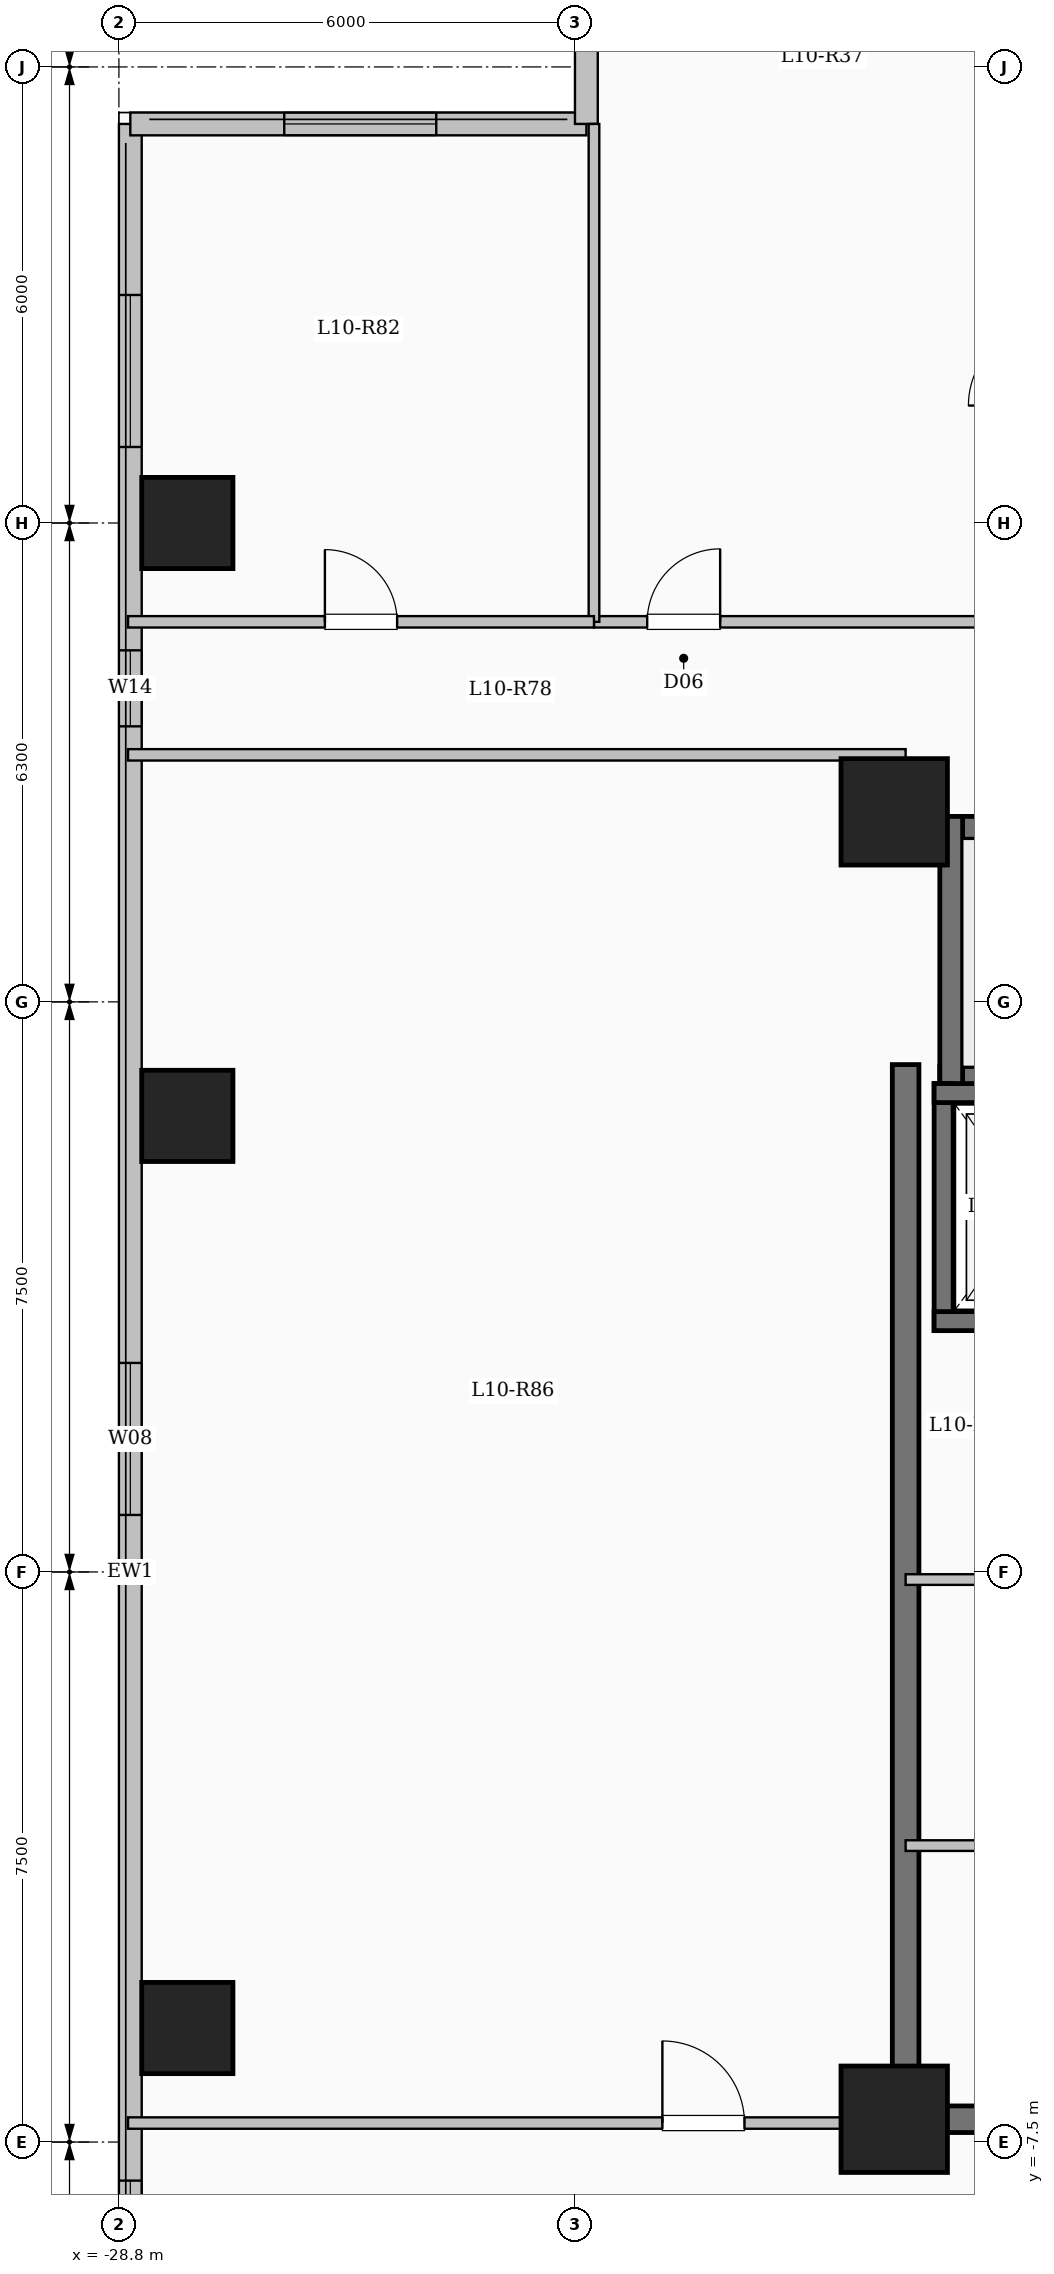
"""IFC4 building model, lengths in metres.
Left out: names, types, materials, properties, quantities, classifications, styles, units other than length and angle.
Written with IfcOpenShell. Run it as: python <this file> out.ifc"""

import sys

from ifc_helpers import new_model, si_unit, direction, frame, frame_2d, origin, origin_2d, place, context, subcontext, project, spatial, rectangle, extrude, element, fill, save


model = new_model("IFC4")
c1 = context("Model", 3, precision=1e-05, world=origin(), true_north=direction((0.0, 1.0)))
c2 = subcontext(c1, "Body", "Model", "MODEL_VIEW")
j1 = project(units=[si_unit("LENGTHUNIT", "METRE"), si_unit("PLANEANGLEUNIT", "RADIAN")], contexts=[c1])
p1 = place(None, origin())
s1 = spatial("IfcSite", under=j1, at=p1, CompositionType="ELEMENT")
p2 = place(p1, origin())
s2 = spatial("IfcBuilding", under=s1, at=p2, CompositionType="ELEMENT")
p3 = place(p2, frame((0.0, 0.0, 40.75)))
s3 = spatial("IfcBuildingStorey", under=s2, at=p3, CompositionType="ELEMENT", Elevation=40.75)
for number, where, z_axis, x_axis in (
    (1, (-18.6, -7.2, 0.0), (0.0, 0.0, 1.0), (1.0, 0.0, 0.0)),
    (2, (-18.6, 10.0, 0.0), (0.0, 0.0, 1.0), (1.0, 0.0, 0.0)),
):
    element("IfcColumn", number, at=place(p3, frame(where, z_axis=z_axis, x_axis=x_axis)), inside=s3, PredefinedType="COLUMN", context=c2, shape_type="SweptSolid", body=[
        extrude(rectangle(XDim=1.4, YDim=1.4, at=origin_2d()), origin(), (0.0, 0.0, 1.0), 3.35),
    ])
for number, where, z_axis, x_axis in (
    (3, (-27.9, -6.0, 0.0), (0.0, 0.0, 1.0), (1.0, 0.0, 0.0)),
    (4, (-27.9, 6.0, 0.0), (0.0, 0.0, 1.0), (1.0, 0.0, 0.0)),
    (5, (-27.9, 13.8, 0.0), (0.0, 0.0, 1.0), (1.0, 0.0, 0.0)),
):
    element("IfcColumn", number, at=place(p3, frame(where, z_axis=z_axis, x_axis=x_axis)), inside=s3, PredefinedType="COLUMN", context=c2, shape_type="SweptSolid", body=[
        extrude(rectangle(XDim=1.2, YDim=1.2, at=origin_2d()), origin(), (0.0, 0.0, 1.0), 3.35),
    ])
p4 = place(p3, frame((-28.65, -19.05, 0.0), z_axis=(0.0, 0.0, 1.0), x_axis=(0.0, 1.0, 0.0)))
e6 = element("IfcWall", 6, at=p4, inside=s3, PredefinedType="SOLIDWALL", context=c2, shape_type="SweptSolid", body=[
    extrude(rectangle(XDim=38.1, YDim=0.3, at=frame_2d((19.05, 0.0))), origin(), (0.0, 0.0, 1.0), 3.1),
])
p5 = place(p4, frame((3.15, 0.0, 0.9)))
e7 = element("IfcOpeningElement", 7, at=p5, cuts=e6, PredefinedType="OPENING", context=c2, shape_type="SweptSolid", body=[
    extrude(rectangle(XDim=2.4, YDim=1.8, at=frame_2d((1.2, 0.9))), frame((0.0, 0.16, 0.0), z_axis=(0.0, -1.0, 0.0), x_axis=(1.0, 0.0, 0.0)), (0.0, 0.0, 1.0), 0.32),
])
p6 = place(p4, frame((9.542, 0.0, 0.9)))
e8 = element("IfcOpeningElement", 8, at=p6, cuts=e6, PredefinedType="OPENING", context=c2, shape_type="SweptSolid", body=[
    extrude(rectangle(XDim=1.5, YDim=1.65, at=frame_2d((0.75, 0.825))), frame((0.0, 0.16, 0.0), z_axis=(0.0, -1.0, 0.0), x_axis=(1.0, 0.0, 0.0)), (0.0, 0.0, 1.0), 0.32),
])
p7 = place(p4, frame((19.8, 0.0, 0.9)))
e9 = element("IfcOpeningElement", 9, at=p7, cuts=e6, PredefinedType="OPENING", context=c2, shape_type="SweptSolid", body=[
    extrude(rectangle(XDim=2.0, YDim=1.7, at=frame_2d((1.0, 0.85))), frame((0.0, 0.16, 0.0), z_axis=(0.0, -1.0, 0.0), x_axis=(1.0, 0.0, 0.0)), (0.0, 0.0, 1.0), 0.32),
])
p8 = place(p4, frame((30.175, 0.0, 0.95)))
e10 = element("IfcOpeningElement", 10, at=p8, cuts=e6, PredefinedType="OPENING", context=c2, shape_type="SweptSolid", body=[
    extrude(rectangle(XDim=1.0, YDim=1.5, at=frame_2d((0.5, 0.75))), frame((0.0, 0.16, 0.0), z_axis=(0.0, -1.0, 0.0), x_axis=(1.0, 0.0, 0.0)), (0.0, 0.0, 1.0), 0.32),
])
p9 = place(p4, frame((33.85, 0.0, 0.9)))
e11 = element("IfcOpeningElement", 11, at=p9, cuts=e6, PredefinedType="OPENING", context=c2, shape_type="SweptSolid", body=[
    extrude(rectangle(XDim=2.0, YDim=1.7, at=frame_2d((1.0, 0.85))), frame((0.0, 0.16, 0.0), z_axis=(0.0, -1.0, 0.0), x_axis=(1.0, 0.0, 0.0)), (0.0, 0.0, 1.0), 0.32),
])
p10 = place(p3, frame((-28.65, 19.05, 0.0), z_axis=(0.0, 0.0, 1.0), x_axis=(1.0, 0.0, 0.0)))
e12 = element("IfcWall", 12, at=p10, inside=s3, PredefinedType="SOLIDWALL", context=c2, shape_type="SweptSolid", body=[
    extrude(rectangle(XDim=6.0, YDim=0.3, at=frame_2d((3.0, 0.0))), origin(), (0.0, 0.0, 1.0), 3.1),
])
p11 = place(p10, frame((2.025, 0.0, 0.9)))
e13 = element("IfcOpeningElement", 13, at=p11, cuts=e12, PredefinedType="OPENING", context=c2, shape_type="SweptSolid", body=[
    extrude(rectangle(XDim=2.0, YDim=1.7, at=frame_2d((1.0, 0.85))), frame((0.0, 0.16, 0.0), z_axis=(0.0, -1.0, 0.0), x_axis=(1.0, 0.0, 0.0)), (0.0, 0.0, 1.0), 0.32),
])
p12 = place(p3, frame((-22.65, 19.05, 0.0), z_axis=(0.0, 0.0, 1.0), x_axis=(0.0, 1.0, 0.0)))
e14 = element("IfcWall", 14, at=p12, inside=s3, PredefinedType="SOLIDWALL", context=c2, shape_type="SweptSolid", body=[
    extrude(rectangle(XDim=4.5, YDim=0.3, at=frame_2d((2.25, 0.0))), origin(), (0.0, 0.0, 1.0), 3.1),
])
p13 = place(p12, frame((1.032, 0.0, 0.9)))
e15 = element("IfcOpeningElement", 15, at=p13, cuts=e14, PredefinedType="OPENING", context=c2, shape_type="SweptSolid", body=[
    extrude(rectangle(XDim=2.4, YDim=1.8, at=frame_2d((1.2, 0.9))), frame((0.0, 0.16, 0.0), z_axis=(0.0, -1.0, 0.0), x_axis=(1.0, 0.0, 0.0)), (0.0, 0.0, 1.0), 0.32),
])
p14 = place(p3, frame((-18.0, 9.79, 0.0), z_axis=(0.0, 0.0, 1.0), x_axis=(1.0, 0.0, 0.0)))
e16 = element("IfcWall", 16, at=p14, inside=s3, PredefinedType="SHEAR", context=c2, shape_type="SweptSolid", body=[
    extrude(rectangle(XDim=8.0, YDim=0.3, at=frame_2d((4.0, 0.0))), origin(), (0.0, 0.0, 1.0), 3.35),
])
p15 = place(p3, frame((-18.0, 6.5, 0.0), z_axis=(0.0, 0.0, 1.0), x_axis=(1.0, 0.0, 0.0)))
e17 = element("IfcWall", 17, at=p15, inside=s3, PredefinedType="SHEAR", context=c2, shape_type="SweptSolid", body=[
    extrude(rectangle(XDim=8.0, YDim=0.3, at=frame_2d((4.0, 0.0))), origin(), (0.0, 0.0, 1.0), 3.35),
])
p16 = place(p15, frame((6.45, 0.0, 0.0)))
e18 = element("IfcOpeningElement", 18, at=p16, cuts=e17, PredefinedType="OPENING", context=c2, shape_type="SweptSolid", body=[
    extrude(rectangle(XDim=1.0, YDim=2.15, at=frame_2d((0.5, 1.075))), frame((0.0, 0.16, 0.0), z_axis=(0.0, -1.0, 0.0), x_axis=(1.0, 0.0, 0.0)), (0.0, 0.0, 1.0), 0.32),
])
p17 = place(p3, frame((-17.85, 6.35, 0.0), z_axis=(0.0, 0.0, 1.0), x_axis=(0.0, 1.0, 0.0)))
e19 = element("IfcWall", 19, at=p17, inside=s3, PredefinedType="SHEAR", context=c2, shape_type="SweptSolid", body=[
    extrude(rectangle(XDim=3.59, YDim=0.3, at=frame_2d((1.795, 0.0))), origin(), (0.0, 0.0, 1.0), 3.35),
])
p18 = place(p3, frame((-17.95, 3.175, 0.0), z_axis=(0.0, 0.0, 1.0), x_axis=(0.0, 1.0, 0.0)))
e20 = element("IfcWall", 20, at=p18, inside=s3, PredefinedType="SHEAR", context=c2, shape_type="SweptSolid", body=[
    extrude(rectangle(XDim=3.25, YDim=0.25, at=frame_2d((1.625, 0.0))), origin(), (0.0, 0.0, 1.0), 3.35),
])
for number, where, z_axis, x_axis in (
    (21, (-18.075, 3.3, 0.0), (0.0, 0.0, 1.0), (1.0, 0.0, 0.0)),
    (22, (-18.075, 6.3, 0.0), (0.0, 0.0, 1.0), (1.0, 0.0, 0.0)),
):
    element("IfcWall", number, at=place(p3, frame(where, z_axis=z_axis, x_axis=x_axis)), inside=s3, PredefinedType="SHEAR", context=c2, shape_type="SweptSolid", body=[
        extrude(rectangle(XDim=2.55, YDim=0.25, at=frame_2d((1.275, 0.0))), origin(), (0.0, 0.0, 1.0), 3.35),
    ])
p19 = place(p3, frame((-18.45, -7.375, 0.0), z_axis=(0.0, 0.0, 1.0), x_axis=(0.0, 1.0, 0.0)))
e23 = element("IfcWall", 23, at=p19, inside=s3, PredefinedType="SHEAR", context=c2, shape_type="SweptSolid", body=[
    extrude(rectangle(XDim=14.05, YDim=0.35, at=frame_2d((7.025, 0.0))), origin(), (0.0, 0.0, 1.0), 3.35),
])
p20 = place(p3, frame((-18.625, -7.2, 0.0), z_axis=(0.0, 0.0, 1.0), x_axis=(1.0, 0.0, 0.0)))
e24 = element("IfcWall", 24, at=p20, inside=s3, PredefinedType="SHEAR", context=c2, shape_type="SweptSolid", body=[
    extrude(rectangle(XDim=8.55, YDim=0.35, at=frame_2d((4.275, 0.0))), origin(), (0.0, 0.0, 1.0), 3.35),
])
p21 = place(p3, frame((-18.45, -3.6, 0.0), z_axis=(0.0, 0.0, 1.0), x_axis=(1.0, 0.0, 0.0)))
e25 = element("IfcWall", 25, at=p21, inside=s3, PredefinedType="PARTITIONING", context=c2, shape_type="SweptSolid", body=[
    extrude(rectangle(XDim=3.05, YDim=0.14, at=frame_2d((1.525, 0.0))), origin(), (0.0, 0.0, 1.0), 3.1),
])
p22 = place(p21, frame((1.05, 0.0, 0.0)))
e26 = element("IfcOpeningElement", 26, at=p22, cuts=e25, PredefinedType="OPENING", context=c2, shape_type="SweptSolid", body=[
    extrude(rectangle(XDim=0.9, YDim=2.08, at=frame_2d((0.45, 1.04))), frame((0.0, 0.08, 0.0), z_axis=(0.0, -1.0, 0.0), x_axis=(1.0, 0.0, 0.0)), (0.0, 0.0, 1.0), 0.16),
])
p23 = place(p3, frame((-18.45, -0.1, 0.0), z_axis=(0.0, 0.0, 1.0), x_axis=(1.0, 0.0, 0.0)))
e27 = element("IfcWall", 27, at=p23, inside=s3, PredefinedType="PARTITIONING", context=c2, shape_type="SweptSolid", body=[
    extrude(rectangle(XDim=3.05, YDim=0.14, at=frame_2d((1.525, 0.0))), origin(), (0.0, 0.0, 1.0), 3.1),
])
p24 = place(p23, frame((1.05, 0.0, 0.0)))
e28 = element("IfcOpeningElement", 28, at=p24, cuts=e27, PredefinedType="OPENING", context=c2, shape_type="SweptSolid", body=[
    extrude(rectangle(XDim=0.9, YDim=2.08, at=frame_2d((0.45, 1.04))), frame((0.0, 0.08, 0.0), z_axis=(0.0, -1.0, 0.0), x_axis=(1.0, 0.0, 0.0)), (0.0, 0.0, 1.0), 0.16),
])
p25 = place(p3, frame((-22.55, 12.5, 0.0), z_axis=(0.0, 0.0, 1.0), x_axis=(1.0, 0.0, 0.0)))
e29 = element("IfcWall", 29, at=p25, inside=s3, PredefinedType="PARTITIONING", context=c2, shape_type="SweptSolid", body=[
    extrude(rectangle(XDim=18.7, YDim=0.15, at=frame_2d((9.35, 0.0))), origin(), (0.0, 0.0, 1.0), 3.1),
])
p26 = place(p25, frame((0.7, 0.0, 0.0)))
e30 = element("IfcOpeningElement", 30, at=p26, cuts=e29, PredefinedType="OPENING", context=c2, shape_type="SweptSolid", body=[
    extrude(rectangle(XDim=0.96, YDim=2.15, at=frame_2d((0.48, 1.075))), frame((0.0, 0.085, 0.0), z_axis=(0.0, -1.0, 0.0), x_axis=(1.0, 0.0, 0.0)), (0.0, 0.0, 1.0), 0.17),
])
p27 = place(p25, frame((13.162, 0.0, 0.0)))
e31 = element("IfcOpeningElement", 31, at=p27, cuts=e29, PredefinedType="OPENING", context=c2, shape_type="SweptSolid", body=[
    extrude(rectangle(XDim=0.96, YDim=2.15, at=frame_2d((0.48, 1.075))), frame((0.0, 0.085, 0.0), z_axis=(0.0, -1.0, 0.0), x_axis=(1.0, 0.0, 0.0)), (0.0, 0.0, 1.0), 0.17),
])
p28 = place(p3, frame((-28.68, -7.25, 0.0), z_axis=(0.0, 0.0, 1.0), x_axis=(1.0, 0.0, 0.0)))
e32 = element("IfcWall", 32, at=p28, inside=s3, PredefinedType="PARTITIONING", context=c2, shape_type="SweptSolid", body=[
    extrude(rectangle(XDim=10.23, YDim=0.15, at=frame_2d((5.115, 0.0))), origin(), (0.0, 0.0, 1.0), 3.1),
])
p29 = place(p28, frame((7.03, 0.0, 0.0)))
e33 = element("IfcOpeningElement", 33, at=p29, cuts=e32, PredefinedType="OPENING", context=c2, shape_type="SweptSolid", body=[
    extrude(rectangle(XDim=1.08, YDim=2.15, at=frame_2d((0.54, 1.075))), frame((0.0, 0.085, 0.0), z_axis=(0.0, -1.0, 0.0), x_axis=(1.0, 0.0, 0.0)), (0.0, 0.0, 1.0), 0.17),
])
p30 = place(p3, frame((-28.68, 10.75, 0.0), z_axis=(0.0, 0.0, 1.0), x_axis=(1.0, 0.0, 0.0)))
e34 = element("IfcWall", 34, at=p30, inside=s3, PredefinedType="PARTITIONING", context=c2, shape_type="SweptSolid", body=[
    extrude(rectangle(XDim=10.23, YDim=0.15, at=frame_2d((5.115, 0.0))), origin(), (0.0, 0.0, 1.0), 3.1),
])
p31 = place(p3, frame((-22.55, 12.5, 0.0), z_axis=(0.0, 0.0, 1.0), x_axis=(0.0, 1.0, 0.0)))
e35 = element("IfcWall", 35, at=p31, inside=s3, PredefinedType="PARTITIONING", context=c2, shape_type="SweptSolid", body=[
    extrude(rectangle(XDim=6.55, YDim=0.14, at=frame_2d((3.275, 0.0))), origin(), (0.0, 0.0, 1.0), 3.1),
])
p32 = place(p3, frame((-28.68, 12.5, 0.0), z_axis=(0.0, 0.0, 1.0), x_axis=(1.0, 0.0, 0.0)))
e36 = element("IfcWall", 36, at=p32, inside=s3, PredefinedType="PARTITIONING", context=c2, shape_type="SweptSolid", body=[
    extrude(rectangle(XDim=6.13, YDim=0.15, at=frame_2d((3.065, 0.0))), origin(), (0.0, 0.0, 1.0), 3.1),
])
p33 = place(p32, frame((2.59, 0.0, 0.0)))
e37 = element("IfcOpeningElement", 37, at=p33, cuts=e36, PredefinedType="OPENING", context=c2, shape_type="SweptSolid", body=[
    extrude(rectangle(XDim=0.95, YDim=2.15, at=frame_2d((0.475, 1.075))), frame((0.0, 0.085, 0.0), z_axis=(0.0, -1.0, 0.0), x_axis=(1.0, 0.0, 0.0)), (0.0, 0.0, 1.0), 0.17),
])
p34 = place(p6, origin())
e38 = element("IfcWindow", 38, at=p34, inside=s3, PartitioningType="SINGLE_PANEL", PredefinedType="WINDOW", context=c2, shape_type="SweptSolid", body=[
    extrude(rectangle(XDim=1.5, YDim=1.65, at=frame_2d((0.75, 0.825))), frame((0.0, 0.03, 0.0), z_axis=(0.0, -1.0, 0.0), x_axis=(1.0, 0.0, 0.0)), (0.0, 0.0, 1.0), 0.06),
])
fill(e8, e38)
p35 = place(p7, origin())
e39 = element("IfcWindow", 39, at=p35, inside=s3, PartitioningType="SINGLE_PANEL", PredefinedType="WINDOW", context=c2, shape_type="SweptSolid", body=[
    extrude(rectangle(XDim=2.0, YDim=1.7, at=frame_2d((1.0, 0.85))), frame((0.0, 0.03, 0.0), z_axis=(0.0, -1.0, 0.0), x_axis=(1.0, 0.0, 0.0)), (0.0, 0.0, 1.0), 0.06),
])
fill(e9, e39)
p36 = place(p8, origin())
e40 = element("IfcWindow", 40, at=p36, inside=s3, PartitioningType="SINGLE_PANEL", PredefinedType="WINDOW", context=c2, shape_type="SweptSolid", body=[
    extrude(rectangle(XDim=1.0, YDim=1.5, at=frame_2d((0.5, 0.75))), frame((0.0, 0.03, 0.0), z_axis=(0.0, -1.0, 0.0), x_axis=(1.0, 0.0, 0.0)), (0.0, 0.0, 1.0), 0.06),
])
fill(e10, e40)
p37 = place(p9, origin())
e41 = element("IfcWindow", 41, at=p37, inside=s3, PartitioningType="SINGLE_PANEL", PredefinedType="WINDOW", context=c2, shape_type="SweptSolid", body=[
    extrude(rectangle(XDim=2.0, YDim=1.7, at=frame_2d((1.0, 0.85))), frame((0.0, 0.03, 0.0), z_axis=(0.0, -1.0, 0.0), x_axis=(1.0, 0.0, 0.0)), (0.0, 0.0, 1.0), 0.06),
])
fill(e11, e41)
p38 = place(p11, origin())
e42 = element("IfcWindow", 42, at=p38, inside=s3, PartitioningType="SINGLE_PANEL", PredefinedType="WINDOW", context=c2, shape_type="SweptSolid", body=[
    extrude(rectangle(XDim=2.0, YDim=1.7, at=frame_2d((1.0, 0.85))), frame((0.0, 0.03, 0.0), z_axis=(0.0, -1.0, 0.0), x_axis=(1.0, 0.0, 0.0)), (0.0, 0.0, 1.0), 0.06),
])
fill(e13, e42)
p39 = place(p26, origin())
e43 = element("IfcDoor", 43, at=p39, inside=s3, OperationType="SINGLE_SWING_RIGHT", PredefinedType="DOOR", context=c2, shape_type="SweptSolid", body=[
    extrude(rectangle(XDim=0.96, YDim=2.15, at=frame_2d((0.48, 1.075))), frame((0.0, 0.025, 0.0), z_axis=(0.0, -1.0, 0.0), x_axis=(1.0, 0.0, 0.0)), (0.0, 0.0, 1.0), 0.05),
])
fill(e30, e43)
p40 = place(p33, origin())
e44 = element("IfcDoor", 44, at=p40, inside=s3, OperationType="SINGLE_SWING_LEFT", PredefinedType="DOOR", context=c2, shape_type="SweptSolid", body=[
    extrude(rectangle(XDim=0.95, YDim=2.15, at=frame_2d((0.475, 1.075))), frame((0.0, 0.025, 0.0), z_axis=(0.0, -1.0, 0.0), x_axis=(1.0, 0.0, 0.0)), (0.0, 0.0, 1.0), 0.05),
])
fill(e37, e44)
p41 = place(p29, origin())
e45 = element("IfcDoor", 45, at=p41, inside=s3, OperationType="SINGLE_SWING_LEFT", PredefinedType="DOOR", context=c2, shape_type="SweptSolid", body=[
    extrude(rectangle(XDim=1.08, YDim=2.15, at=frame_2d((0.54, 1.075))), frame((0.0, 0.025, 0.0), z_axis=(0.0, -1.0, 0.0), x_axis=(1.0, 0.0, 0.0)), (0.0, 0.0, 1.0), 0.05),
])
fill(e33, e45)
save(model, sys.argv[1])
